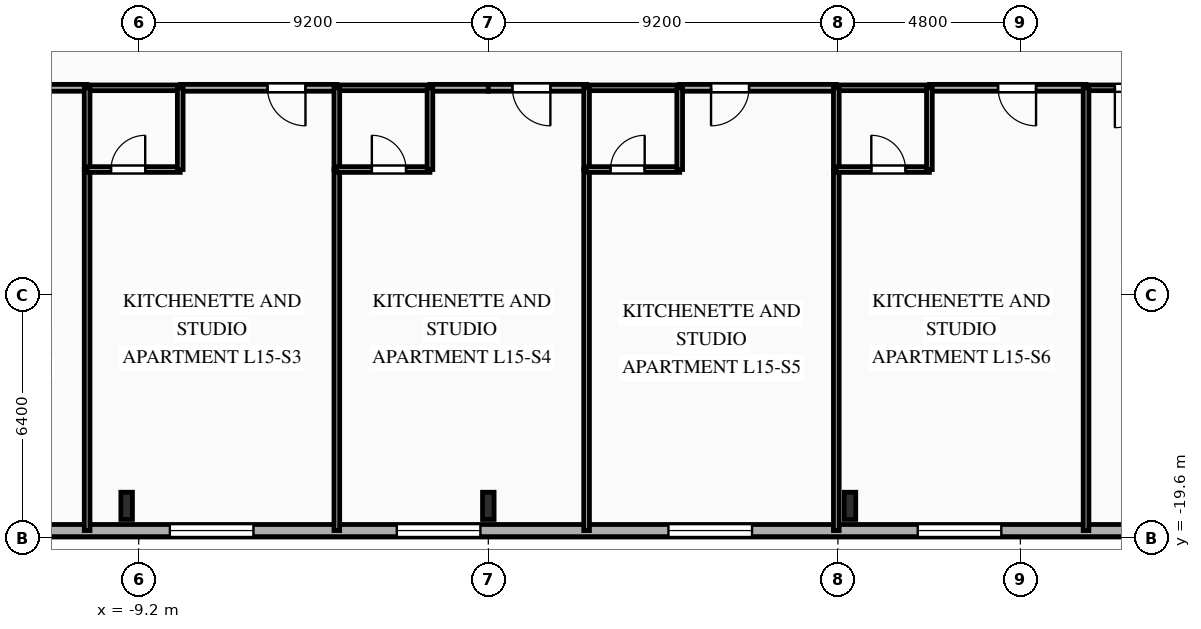
"""IFC4 building model, lengths in metres.
Left out: names, types, materials, properties, quantities, classifications, styles, units other than length and angle.
Written with IfcOpenShell. Run it as: python <this file> out.ifc"""

import sys

from ifc_helpers import new_model, si_unit, direction, frame, frame_2d, origin, origin_2d, place, context, subcontext, project, spatial, rectangle, i_section, extrude, element, fill, save


model = new_model("IFC4")
c1 = context("Model", 3, precision=1e-05, world=origin(), true_north=direction((0.0, 1.0)))
c2 = subcontext(c1, "Body", "Model", "MODEL_VIEW")
j1 = project(units=[si_unit("LENGTHUNIT", "METRE"), si_unit("PLANEANGLEUNIT", "RADIAN")], contexts=[c1])
p1 = place(None, origin())
s1 = spatial("IfcSite", under=j1, at=p1, CompositionType="ELEMENT")
p2 = place(p1, origin())
s2 = spatial("IfcBuilding", under=s1, at=p2, CompositionType="ELEMENT")
p3 = place(p2, frame((0.0, 0.0, 57.15)))
s3 = spatial("IfcBuildingStorey", under=s2, at=p3, CompositionType="ELEMENT", Elevation=57.15)
for number, where, z_axis, x_axis in (
    (1, (-9.517, -18.75, 0.0), (0.0, 0.0, 1.0), (1.0, 0.0, 0.0)),
    (2, (0.0, -18.75, 0.0), (0.0, 0.0, 1.0), (1.0, 0.0, 0.0)),
    (3, (9.517, -18.75, 0.0), (0.0, 0.0, 1.0), (1.0, 0.0, 0.0)),
):
    element("IfcColumn", number, at=place(p3, frame(where, z_axis=z_axis, x_axis=x_axis)), inside=s3, PredefinedType="COLUMN", context=c2, shape_type="SweptSolid", body=[
        extrude(i_section(OverallWidth=0.304, OverallDepth=0.716, WebThickness=0.021, FlangeThickness=0.04, FilletRadius=0.027, at=origin_2d()), origin(), (0.0, 0.0, 1.0), 3.35),
    ])
p4 = place(p3, frame((29.2, -19.4, 0.0), z_axis=(0.0, 0.0, 1.0), x_axis=(-1.0, 0.0, 0.0)))
e4 = element("IfcWall", 4, at=p4, inside=s3, PredefinedType="SOLIDWALL", context=c2, shape_type="SweptSolid", body=[
    extrude(rectangle(XDim=58.4, YDim=0.32, at=frame_2d((29.2, 0.0))), origin(), (0.0, 0.0, 1.0), 3.035),
])
p5 = place(p4, frame((7.215, 0.0, 0.85)))
e5 = element("IfcOpeningElement", 5, at=p5, cuts=e4, PredefinedType="OPENING", context=c2, shape_type="SweptSolid", body=[
    extrude(rectangle(XDim=1.65, YDim=1.85, at=frame_2d((0.825, 0.925))), frame((0.0, 0.17, 0.0), z_axis=(0.0, -1.0, 0.0), x_axis=(1.0, 0.0, 0.0)), (0.0, 0.0, 1.0), 0.34),
])
p6 = place(p4, frame((10.855, 0.0, 0.85)))
e6 = element("IfcOpeningElement", 6, at=p6, cuts=e4, PredefinedType="OPENING", context=c2, shape_type="SweptSolid", body=[
    extrude(rectangle(XDim=1.65, YDim=1.85, at=frame_2d((0.825, 0.925))), frame((0.0, 0.17, 0.0), z_axis=(0.0, -1.0, 0.0), x_axis=(1.0, 0.0, 0.0)), (0.0, 0.0, 1.0), 0.34),
])
p7 = place(p4, frame((15.7, 0.0, 0.85)))
e7 = element("IfcOpeningElement", 7, at=p7, cuts=e4, PredefinedType="OPENING", context=c2, shape_type="SweptSolid", body=[
    extrude(rectangle(XDim=2.2, YDim=1.85, at=frame_2d((1.1, 0.925))), frame((0.0, 0.17, 0.0), z_axis=(0.0, -1.0, 0.0), x_axis=(1.0, 0.0, 0.0)), (0.0, 0.0, 1.0), 0.34),
])
p8 = place(p4, frame((22.26, 0.0, 0.85)))
e8 = element("IfcOpeningElement", 8, at=p8, cuts=e4, PredefinedType="OPENING", context=c2, shape_type="SweptSolid", body=[
    extrude(rectangle(XDim=2.2, YDim=1.85, at=frame_2d((1.1, 0.925))), frame((0.0, 0.17, 0.0), z_axis=(0.0, -1.0, 0.0), x_axis=(1.0, 0.0, 0.0)), (0.0, 0.0, 1.0), 0.34),
])
p9 = place(p4, frame((29.408, 0.0, 0.85)))
e9 = element("IfcOpeningElement", 9, at=p9, cuts=e4, PredefinedType="OPENING", context=c2, shape_type="SweptSolid", body=[
    extrude(rectangle(XDim=2.2, YDim=1.85, at=frame_2d((1.1, 0.925))), frame((0.0, 0.17, 0.0), z_axis=(0.0, -1.0, 0.0), x_axis=(1.0, 0.0, 0.0)), (0.0, 0.0, 1.0), 0.34),
])
p10 = place(p4, frame((35.38, 0.0, 0.85)))
e10 = element("IfcOpeningElement", 10, at=p10, cuts=e4, PredefinedType="OPENING", context=c2, shape_type="SweptSolid", body=[
    extrude(rectangle(XDim=2.2, YDim=1.85, at=frame_2d((1.1, 0.925))), frame((0.0, 0.17, 0.0), z_axis=(0.0, -1.0, 0.0), x_axis=(1.0, 0.0, 0.0)), (0.0, 0.0, 1.0), 0.34),
])
p11 = place(p4, frame((41.98, 0.0, 0.85)))
e11 = element("IfcOpeningElement", 11, at=p11, cuts=e4, PredefinedType="OPENING", context=c2, shape_type="SweptSolid", body=[
    extrude(rectangle(XDim=2.2, YDim=1.85, at=frame_2d((1.1, 0.925))), frame((0.0, 0.17, 0.0), z_axis=(0.0, -1.0, 0.0), x_axis=(1.0, 0.0, 0.0)), (0.0, 0.0, 1.0), 0.34),
])
p12 = place(p4, frame((48.495, 0.0, 0.85)))
e12 = element("IfcOpeningElement", 12, at=p12, cuts=e4, PredefinedType="OPENING", context=c2, shape_type="SweptSolid", body=[
    extrude(rectangle(XDim=1.65, YDim=1.85, at=frame_2d((0.825, 0.925))), frame((0.0, 0.17, 0.0), z_axis=(0.0, -1.0, 0.0), x_axis=(1.0, 0.0, 0.0)), (0.0, 0.0, 1.0), 0.34),
])
p13 = place(p3, frame((-10.557, -7.75, 0.0), z_axis=(0.0, 0.0, 1.0), x_axis=(-1.0, 0.0, 0.0)))
e13 = element("IfcWall", 13, at=p13, inside=s3, PredefinedType="PARTITIONING", context=c2, shape_type="SweptSolid", body=[
    extrude(rectangle(XDim=4.122, YDim=0.18, at=frame_2d((2.061, 0.0))), origin(), (0.0, 0.0, 1.0), 3.035),
])
p14 = place(p13, frame((2.297, 0.0, 0.0)))
e14 = element("IfcOpeningElement", 14, at=p14, cuts=e13, PredefinedType="OPENING", context=c2, shape_type="SweptSolid", body=[
    extrude(rectangle(XDim=1.0, YDim=2.15, at=frame_2d((0.5, 1.075))), frame((0.0, 0.1, 0.0), z_axis=(0.0, -1.0, 0.0), x_axis=(1.0, 0.0, 0.0)), (0.0, 0.0, 1.0), 0.2),
])
p15 = place(p3, frame((-3.986, -7.75, 0.0), z_axis=(0.0, 0.0, 1.0), x_axis=(-1.0, 0.0, 0.0)))
e15 = element("IfcWall", 15, at=p15, inside=s3, PredefinedType="PARTITIONING", context=c2, shape_type="SweptSolid", body=[
    extrude(rectangle(XDim=4.121, YDim=0.18, at=frame_2d((2.061, 0.0))), origin(), (0.0, 0.0, 1.0), 3.035),
])
p16 = place(p15, frame((0.825, 0.0, 0.0)))
e16 = element("IfcOpeningElement", 16, at=p16, cuts=e15, PredefinedType="OPENING", context=c2, shape_type="SweptSolid", body=[
    extrude(rectangle(XDim=1.0, YDim=2.15, at=frame_2d((0.5, 1.075))), frame((0.0, 0.1, 0.0), z_axis=(0.0, -1.0, 0.0), x_axis=(1.0, 0.0, 0.0)), (0.0, 0.0, 1.0), 0.2),
])
p17 = place(p3, frame((-8.107, -7.75, 0.0), z_axis=(0.0, 0.0, 1.0), x_axis=(-1.0, 0.0, 0.0)))
e17 = element("IfcWall", 17, at=p17, inside=s3, PredefinedType="PLUMBINGWALL", context=c2, shape_type="SweptSolid", body=[
    extrude(rectangle(XDim=2.45, YDim=0.15, at=frame_2d((1.225, 0.0))), origin(), (0.0, 0.0, 1.0), 3.035),
])
p18 = place(p3, frame((0.0, -7.75, 0.0), z_axis=(0.0, 0.0, 1.0), x_axis=(-1.0, 0.0, 0.0)))
e18 = element("IfcWall", 18, at=p18, inside=s3, PredefinedType="PARTITIONING", context=c2, shape_type="SweptSolid", body=[
    extrude(rectangle(XDim=1.536, YDim=0.18, at=frame_2d((0.768, 0.0))), origin(), (0.0, 0.0, 1.0), 3.035),
])
p19 = place(p3, frame((-1.536, -7.75, 0.0), z_axis=(0.0, 0.0, 1.0), x_axis=(-1.0, 0.0, 0.0)))
e19 = element("IfcWall", 19, at=p19, inside=s3, PredefinedType="PLUMBINGWALL", context=c2, shape_type="SweptSolid", body=[
    extrude(rectangle(XDim=2.45, YDim=0.15, at=frame_2d((1.225, 0.0))), origin(), (0.0, 0.0, 1.0), 3.035),
])
p20 = place(p3, frame((2.586, -7.75, 0.0), z_axis=(0.0, 0.0, 1.0), x_axis=(-1.0, 0.0, 0.0)))
e20 = element("IfcWall", 20, at=p20, inside=s3, PredefinedType="PARTITIONING", context=c2, shape_type="SweptSolid", body=[
    extrude(rectangle(XDim=2.586, YDim=0.18, at=frame_2d((1.293, 0.0))), origin(), (0.0, 0.0, 1.0), 3.035),
])
p21 = place(p20, frame((0.953, 0.0, 0.0)))
e21 = element("IfcOpeningElement", 21, at=p21, cuts=e20, PredefinedType="OPENING", context=c2, shape_type="SweptSolid", body=[
    extrude(rectangle(XDim=1.0, YDim=2.15, at=frame_2d((0.5, 1.075))), frame((0.0, 0.1, 0.0), z_axis=(0.0, -1.0, 0.0), x_axis=(1.0, 0.0, 0.0)), (0.0, 0.0, 1.0), 0.2),
])
p22 = place(p3, frame((9.157, -7.75, 0.0), z_axis=(0.0, 0.0, 1.0), x_axis=(-1.0, 0.0, 0.0)))
e22 = element("IfcWall", 22, at=p22, inside=s3, PredefinedType="PARTITIONING", context=c2, shape_type="SweptSolid", body=[
    extrude(rectangle(XDim=4.121, YDim=0.18, at=frame_2d((2.061, 0.0))), origin(), (0.0, 0.0, 1.0), 3.035),
])
p23 = place(p22, frame((2.296, 0.0, 0.0)))
e23 = element("IfcOpeningElement", 23, at=p23, cuts=e22, PredefinedType="OPENING", context=c2, shape_type="SweptSolid", body=[
    extrude(rectangle(XDim=1.0, YDim=2.15, at=frame_2d((0.5, 1.075))), frame((0.0, 0.1, 0.0), z_axis=(0.0, -1.0, 0.0), x_axis=(1.0, 0.0, 0.0)), (0.0, 0.0, 1.0), 0.2),
])
p24 = place(p3, frame((5.036, -7.75, 0.0), z_axis=(0.0, 0.0, 1.0), x_axis=(-1.0, 0.0, 0.0)))
e24 = element("IfcWall", 24, at=p24, inside=s3, PredefinedType="PLUMBINGWALL", context=c2, shape_type="SweptSolid", body=[
    extrude(rectangle(XDim=2.45, YDim=0.15, at=frame_2d((1.225, 0.0))), origin(), (0.0, 0.0, 1.0), 3.035),
])
p25 = place(p3, frame((15.729, -7.75, 0.0), z_axis=(0.0, 0.0, 1.0), x_axis=(-1.0, 0.0, 0.0)))
e25 = element("IfcWall", 25, at=p25, inside=s3, PredefinedType="PARTITIONING", context=c2, shape_type="SweptSolid", body=[
    extrude(rectangle(XDim=4.122, YDim=0.18, at=frame_2d((2.061, 0.0))), origin(), (0.0, 0.0, 1.0), 3.035),
])
p26 = place(p25, frame((1.316, 0.0, 0.0)))
e26 = element("IfcOpeningElement", 26, at=p26, cuts=e25, PredefinedType="OPENING", context=c2, shape_type="SweptSolid", body=[
    extrude(rectangle(XDim=1.0, YDim=2.15, at=frame_2d((0.5, 1.075))), frame((0.0, 0.1, 0.0), z_axis=(0.0, -1.0, 0.0), x_axis=(1.0, 0.0, 0.0)), (0.0, 0.0, 1.0), 0.2),
])
p27 = place(p3, frame((11.607, -7.75, 0.0), z_axis=(0.0, 0.0, 1.0), x_axis=(-1.0, 0.0, 0.0)))
e27 = element("IfcWall", 27, at=p27, inside=s3, PredefinedType="PLUMBINGWALL", context=c2, shape_type="SweptSolid", body=[
    extrude(rectangle(XDim=2.45, YDim=0.15, at=frame_2d((1.225, 0.0))), origin(), (0.0, 0.0, 1.0), 3.035),
])
p28 = place(p3, frame((19.365, -7.75, 0.0), z_axis=(0.0, 0.0, 1.0), x_axis=(-1.0, 0.0, 0.0)))
e28 = element("IfcWall", 28, at=p28, inside=s3, PredefinedType="PARTITIONING", context=c2, shape_type="SweptSolid", body=[
    extrude(rectangle(XDim=3.635, YDim=0.15, at=frame_2d((1.818, 0.0))), origin(), (0.0, 0.0, 1.0), 3.035),
])
p29 = place(p28, frame((1.827, 0.0, 0.0)))
e29 = element("IfcOpeningElement", 29, at=p29, cuts=e28, PredefinedType="OPENING", context=c2, shape_type="SweptSolid", body=[
    extrude(rectangle(XDim=1.05, YDim=2.15, at=frame_2d((0.525, 1.075))), frame((0.0, 0.085, 0.0), z_axis=(0.0, -1.0, 0.0), x_axis=(1.0, 0.0, 0.0)), (0.0, 0.0, 1.0), 0.17),
])
p30 = place(p3, frame((-10.557, -9.9, 0.0), z_axis=(0.0, 0.0, 1.0), x_axis=(0.0, -1.0, 0.0)))
e30 = element("IfcWall", 30, at=p30, inside=s3, PredefinedType="PARTITIONING", context=c2, shape_type="SweptSolid", body=[
    extrude(rectangle(XDim=9.5, YDim=0.15, at=frame_2d((4.75, 0.0))), origin(), (0.0, 0.0, 1.0), 3.035),
])
p31 = place(p3, frame((-10.557, -7.75, 0.0), z_axis=(0.0, 0.0, 1.0), x_axis=(0.0, -1.0, 0.0)))
e31 = element("IfcWall", 31, at=p31, inside=s3, PredefinedType="PLUMBINGWALL", context=c2, shape_type="SweptSolid", body=[
    extrude(rectangle(XDim=2.15, YDim=0.15, at=frame_2d((1.075, 0.0))), origin(), (0.0, 0.0, 1.0), 3.035),
])
p32 = place(p3, frame((-10.557, -9.9, 0.0), z_axis=(0.0, 0.0, 1.0), x_axis=(1.0, 0.0, 0.0)))
e32 = element("IfcWall", 32, at=p32, inside=s3, PredefinedType="PLUMBINGWALL", context=c2, shape_type="SweptSolid", body=[
    extrude(rectangle(XDim=2.45, YDim=0.15, at=frame_2d((1.225, 0.0))), origin(), (0.0, 0.0, 1.0), 3.035),
])
p33 = place(p32, frame((0.629, 0.0, 0.0)))
e33 = element("IfcOpeningElement", 33, at=p33, cuts=e32, PredefinedType="OPENING", context=c2, shape_type="SweptSolid", body=[
    extrude(rectangle(XDim=0.9, YDim=2.1, at=frame_2d((0.45, 1.05))), frame((0.0, 0.085, 0.0), z_axis=(0.0, -1.0, 0.0), x_axis=(1.0, 0.0, 0.0)), (0.0, 0.0, 1.0), 0.17),
])
p34 = place(p3, frame((-8.107, -9.9, 0.0), z_axis=(0.0, 0.0, 1.0), x_axis=(0.0, 1.0, 0.0)))
e34 = element("IfcWall", 34, at=p34, inside=s3, PredefinedType="PLUMBINGWALL", context=c2, shape_type="SweptSolid", body=[
    extrude(rectangle(XDim=2.15, YDim=0.15, at=frame_2d((1.075, 0.0))), origin(), (0.0, 0.0, 1.0), 3.035),
])
p35 = place(p3, frame((-3.986, -9.9, 0.0), z_axis=(0.0, 0.0, 1.0), x_axis=(0.0, -1.0, 0.0)))
e35 = element("IfcWall", 35, at=p35, inside=s3, PredefinedType="PARTITIONING", context=c2, shape_type="SweptSolid", body=[
    extrude(rectangle(XDim=9.5, YDim=0.15, at=frame_2d((4.75, 0.0))), origin(), (0.0, 0.0, 1.0), 3.035),
])
p36 = place(p3, frame((-3.986, -7.75, 0.0), z_axis=(0.0, 0.0, 1.0), x_axis=(0.0, -1.0, 0.0)))
e36 = element("IfcWall", 36, at=p36, inside=s3, PredefinedType="PLUMBINGWALL", context=c2, shape_type="SweptSolid", body=[
    extrude(rectangle(XDim=2.15, YDim=0.15, at=frame_2d((1.075, 0.0))), origin(), (0.0, 0.0, 1.0), 3.035),
])
p37 = place(p3, frame((-3.986, -9.9, 0.0), z_axis=(0.0, 0.0, 1.0), x_axis=(1.0, 0.0, 0.0)))
e37 = element("IfcWall", 37, at=p37, inside=s3, PredefinedType="PLUMBINGWALL", context=c2, shape_type="SweptSolid", body=[
    extrude(rectangle(XDim=2.45, YDim=0.15, at=frame_2d((1.225, 0.0))), origin(), (0.0, 0.0, 1.0), 3.035),
])
p38 = place(p37, frame((0.921, 0.0, 0.0)))
e38 = element("IfcOpeningElement", 38, at=p38, cuts=e37, PredefinedType="OPENING", context=c2, shape_type="SweptSolid", body=[
    extrude(rectangle(XDim=0.9, YDim=2.1, at=frame_2d((0.45, 1.05))), frame((0.0, 0.085, 0.0), z_axis=(0.0, -1.0, 0.0), x_axis=(1.0, 0.0, 0.0)), (0.0, 0.0, 1.0), 0.17),
])
p39 = place(p3, frame((-1.536, -9.9, 0.0), z_axis=(0.0, 0.0, 1.0), x_axis=(0.0, 1.0, 0.0)))
e39 = element("IfcWall", 39, at=p39, inside=s3, PredefinedType="PLUMBINGWALL", context=c2, shape_type="SweptSolid", body=[
    extrude(rectangle(XDim=2.15, YDim=0.15, at=frame_2d((1.075, 0.0))), origin(), (0.0, 0.0, 1.0), 3.035),
])
p40 = place(p3, frame((2.586, -9.9, 0.0), z_axis=(0.0, 0.0, 1.0), x_axis=(0.0, -1.0, 0.0)))
e40 = element("IfcWall", 40, at=p40, inside=s3, PredefinedType="PARTITIONING", context=c2, shape_type="SweptSolid", body=[
    extrude(rectangle(XDim=9.5, YDim=0.15, at=frame_2d((4.75, 0.0))), origin(), (0.0, 0.0, 1.0), 3.035),
])
p41 = place(p3, frame((2.586, -7.75, 0.0), z_axis=(0.0, 0.0, 1.0), x_axis=(0.0, -1.0, 0.0)))
e41 = element("IfcWall", 41, at=p41, inside=s3, PredefinedType="PLUMBINGWALL", context=c2, shape_type="SweptSolid", body=[
    extrude(rectangle(XDim=2.15, YDim=0.15, at=frame_2d((1.075, 0.0))), origin(), (0.0, 0.0, 1.0), 3.035),
])
p42 = place(p3, frame((2.586, -9.9, 0.0), z_axis=(0.0, 0.0, 1.0), x_axis=(1.0, 0.0, 0.0)))
e42 = element("IfcWall", 42, at=p42, inside=s3, PredefinedType="PLUMBINGWALL", context=c2, shape_type="SweptSolid", body=[
    extrude(rectangle(XDim=2.45, YDim=0.15, at=frame_2d((1.225, 0.0))), origin(), (0.0, 0.0, 1.0), 3.035),
])
p43 = place(p42, frame((0.629, 0.0, 0.0)))
e43 = element("IfcOpeningElement", 43, at=p43, cuts=e42, PredefinedType="OPENING", context=c2, shape_type="SweptSolid", body=[
    extrude(rectangle(XDim=0.9, YDim=2.1, at=frame_2d((0.45, 1.05))), frame((0.0, 0.085, 0.0), z_axis=(0.0, -1.0, 0.0), x_axis=(1.0, 0.0, 0.0)), (0.0, 0.0, 1.0), 0.17),
])
p44 = place(p3, frame((5.036, -9.9, 0.0), z_axis=(0.0, 0.0, 1.0), x_axis=(0.0, 1.0, 0.0)))
e44 = element("IfcWall", 44, at=p44, inside=s3, PredefinedType="PLUMBINGWALL", context=c2, shape_type="SweptSolid", body=[
    extrude(rectangle(XDim=2.15, YDim=0.15, at=frame_2d((1.075, 0.0))), origin(), (0.0, 0.0, 1.0), 3.035),
])
p45 = place(p3, frame((9.157, -9.9, 0.0), z_axis=(0.0, 0.0, 1.0), x_axis=(0.0, -1.0, 0.0)))
e45 = element("IfcWall", 45, at=p45, inside=s3, PredefinedType="PARTITIONING", context=c2, shape_type="SweptSolid", body=[
    extrude(rectangle(XDim=9.5, YDim=0.15, at=frame_2d((4.75, 0.0))), origin(), (0.0, 0.0, 1.0), 2.52),
])
p46 = place(p3, frame((9.157, -7.75, 0.0), z_axis=(0.0, 0.0, 1.0), x_axis=(0.0, -1.0, 0.0)))
e46 = element("IfcWall", 46, at=p46, inside=s3, PredefinedType="PLUMBINGWALL", context=c2, shape_type="SweptSolid", body=[
    extrude(rectangle(XDim=2.15, YDim=0.15, at=frame_2d((1.075, 0.0))), origin(), (0.0, 0.0, 1.0), 2.52),
])
p47 = place(p3, frame((9.157, -9.9, 0.0), z_axis=(0.0, 0.0, 1.0), x_axis=(1.0, 0.0, 0.0)))
e47 = element("IfcWall", 47, at=p47, inside=s3, PredefinedType="PLUMBINGWALL", context=c2, shape_type="SweptSolid", body=[
    extrude(rectangle(XDim=2.45, YDim=0.15, at=frame_2d((1.225, 0.0))), origin(), (0.0, 0.0, 1.0), 3.035),
])
p48 = place(p47, frame((0.921, 0.0, 0.0)))
e48 = element("IfcOpeningElement", 48, at=p48, cuts=e47, PredefinedType="OPENING", context=c2, shape_type="SweptSolid", body=[
    extrude(rectangle(XDim=0.9, YDim=2.1, at=frame_2d((0.45, 1.05))), frame((0.0, 0.085, 0.0), z_axis=(0.0, -1.0, 0.0), x_axis=(1.0, 0.0, 0.0)), (0.0, 0.0, 1.0), 0.17),
])
p49 = place(p3, frame((11.607, -9.9, 0.0), z_axis=(0.0, 0.0, 1.0), x_axis=(0.0, 1.0, 0.0)))
e49 = element("IfcWall", 49, at=p49, inside=s3, PredefinedType="PLUMBINGWALL", context=c2, shape_type="SweptSolid", body=[
    extrude(rectangle(XDim=2.15, YDim=0.15, at=frame_2d((1.075, 0.0))), origin(), (0.0, 0.0, 1.0), 3.035),
])
p50 = place(p3, frame((15.729, -7.75, 0.0), z_axis=(0.0, 0.0, 1.0), x_axis=(0.0, -1.0, 0.0)))
e50 = element("IfcWall", 50, at=p50, inside=s3, PredefinedType="PARTITIONING", context=c2, shape_type="SweptSolid", body=[
    extrude(rectangle(XDim=11.65, YDim=0.15, at=frame_2d((5.825, 0.0))), origin(), (0.0, 0.0, 1.0), 3.035),
])
p51 = place(p7, origin())
e51 = element("IfcWindow", 51, at=p51, inside=s3, PartitioningType="SINGLE_PANEL", PredefinedType="WINDOW", context=c2, shape_type="SweptSolid", body=[
    extrude(rectangle(XDim=2.2, YDim=1.85, at=frame_2d((1.1, 0.925))), frame((0.0, 0.03, 0.0), z_axis=(0.0, -1.0, 0.0), x_axis=(1.0, 0.0, 0.0)), (0.0, 0.0, 1.0), 0.06),
])
fill(e7, e51)
p52 = place(p8, origin())
e52 = element("IfcWindow", 52, at=p52, inside=s3, PartitioningType="SINGLE_PANEL", PredefinedType="WINDOW", context=c2, shape_type="SweptSolid", body=[
    extrude(rectangle(XDim=2.2, YDim=1.85, at=frame_2d((1.1, 0.925))), frame((0.0, 0.03, 0.0), z_axis=(0.0, -1.0, 0.0), x_axis=(1.0, 0.0, 0.0)), (0.0, 0.0, 1.0), 0.06),
])
fill(e8, e52)
p53 = place(p9, origin())
e53 = element("IfcWindow", 53, at=p53, inside=s3, PartitioningType="SINGLE_PANEL", PredefinedType="WINDOW", context=c2, shape_type="SweptSolid", body=[
    extrude(rectangle(XDim=2.2, YDim=1.85, at=frame_2d((1.1, 0.925))), frame((0.0, 0.03, 0.0), z_axis=(0.0, -1.0, 0.0), x_axis=(1.0, 0.0, 0.0)), (0.0, 0.0, 1.0), 0.06),
])
fill(e9, e53)
p54 = place(p10, origin())
e54 = element("IfcWindow", 54, at=p54, inside=s3, PartitioningType="SINGLE_PANEL", PredefinedType="WINDOW", context=c2, shape_type="SweptSolid", body=[
    extrude(rectangle(XDim=2.2, YDim=1.85, at=frame_2d((1.1, 0.925))), frame((0.0, 0.03, 0.0), z_axis=(0.0, -1.0, 0.0), x_axis=(1.0, 0.0, 0.0)), (0.0, 0.0, 1.0), 0.06),
])
fill(e10, e54)
p55 = place(p16, origin())
e55 = element("IfcDoor", 55, at=p55, inside=s3, OperationType="SINGLE_SWING_LEFT", PredefinedType="DOOR", context=c2, shape_type="SweptSolid", body=[
    extrude(rectangle(XDim=1.0, YDim=2.15, at=frame_2d((0.5, 1.075))), frame((0.0, 0.025, 0.0), z_axis=(0.0, -1.0, 0.0), x_axis=(1.0, 0.0, 0.0)), (0.0, 0.0, 1.0), 0.05),
])
fill(e16, e55)
p56 = place(p21, origin())
e56 = element("IfcDoor", 56, at=p56, inside=s3, OperationType="SINGLE_SWING_LEFT", PredefinedType="DOOR", context=c2, shape_type="SweptSolid", body=[
    extrude(rectangle(XDim=1.0, YDim=2.15, at=frame_2d((0.5, 1.075))), frame((0.0, 0.025, 0.0), z_axis=(0.0, -1.0, 0.0), x_axis=(1.0, 0.0, 0.0)), (0.0, 0.0, 1.0), 0.05),
])
fill(e21, e56)
p57 = place(p23, origin())
e57 = element("IfcDoor", 57, at=p57, inside=s3, OperationType="SINGLE_SWING_RIGHT", PredefinedType="DOOR", context=c2, shape_type="SweptSolid", body=[
    extrude(rectangle(XDim=1.0, YDim=2.15, at=frame_2d((0.5, 1.075))), frame((0.0, 0.025, 0.0), z_axis=(0.0, -1.0, 0.0), x_axis=(1.0, 0.0, 0.0)), (0.0, 0.0, 1.0), 0.05),
])
fill(e23, e57)
p58 = place(p26, origin())
e58 = element("IfcDoor", 58, at=p58, inside=s3, OperationType="SINGLE_SWING_LEFT", PredefinedType="DOOR", context=c2, shape_type="SweptSolid", body=[
    extrude(rectangle(XDim=1.0, YDim=2.15, at=frame_2d((0.5, 1.075))), frame((0.0, 0.025, 0.0), z_axis=(0.0, -1.0, 0.0), x_axis=(1.0, 0.0, 0.0)), (0.0, 0.0, 1.0), 0.05),
])
fill(e26, e58)
p59 = place(p29, origin())
e59 = element("IfcDoor", 59, at=p59, inside=s3, OperationType="SINGLE_SWING_RIGHT", PredefinedType="DOOR", context=c2, shape_type="SweptSolid", body=[
    extrude(rectangle(XDim=1.05, YDim=2.15, at=frame_2d((0.525, 1.075))), frame((0.0, 0.025, 0.0), z_axis=(0.0, -1.0, 0.0), x_axis=(1.0, 0.0, 0.0)), (0.0, 0.0, 1.0), 0.05),
])
fill(e29, e59)
p60 = place(p33, origin())
e60 = element("IfcDoor", 60, at=p60, inside=s3, OperationType="SINGLE_SWING_RIGHT", PredefinedType="DOOR", context=c2, shape_type="SweptSolid", body=[
    extrude(rectangle(XDim=0.9, YDim=2.1, at=frame_2d((0.45, 1.05))), frame((0.0, 0.025, 0.0), z_axis=(0.0, -1.0, 0.0), x_axis=(1.0, 0.0, 0.0)), (0.0, 0.0, 1.0), 0.05),
])
fill(e33, e60)
p61 = place(p38, origin())
e61 = element("IfcDoor", 61, at=p61, inside=s3, OperationType="SINGLE_SWING_LEFT", PredefinedType="DOOR", context=c2, shape_type="SweptSolid", body=[
    extrude(rectangle(XDim=0.9, YDim=2.1, at=frame_2d((0.45, 1.05))), frame((0.0, 0.025, 0.0), z_axis=(0.0, -1.0, 0.0), x_axis=(1.0, 0.0, 0.0)), (0.0, 0.0, 1.0), 0.05),
])
fill(e38, e61)
p62 = place(p43, origin())
e62 = element("IfcDoor", 62, at=p62, inside=s3, OperationType="SINGLE_SWING_RIGHT", PredefinedType="DOOR", context=c2, shape_type="SweptSolid", body=[
    extrude(rectangle(XDim=0.9, YDim=2.1, at=frame_2d((0.45, 1.05))), frame((0.0, 0.025, 0.0), z_axis=(0.0, -1.0, 0.0), x_axis=(1.0, 0.0, 0.0)), (0.0, 0.0, 1.0), 0.05),
])
fill(e43, e62)
p63 = place(p48, origin())
e63 = element("IfcDoor", 63, at=p63, inside=s3, OperationType="SINGLE_SWING_LEFT", PredefinedType="DOOR", context=c2, shape_type="SweptSolid", body=[
    extrude(rectangle(XDim=0.9, YDim=2.1, at=frame_2d((0.45, 1.05))), frame((0.0, 0.025, 0.0), z_axis=(0.0, -1.0, 0.0), x_axis=(1.0, 0.0, 0.0)), (0.0, 0.0, 1.0), 0.05),
])
fill(e48, e63)
save(model, sys.argv[1])
